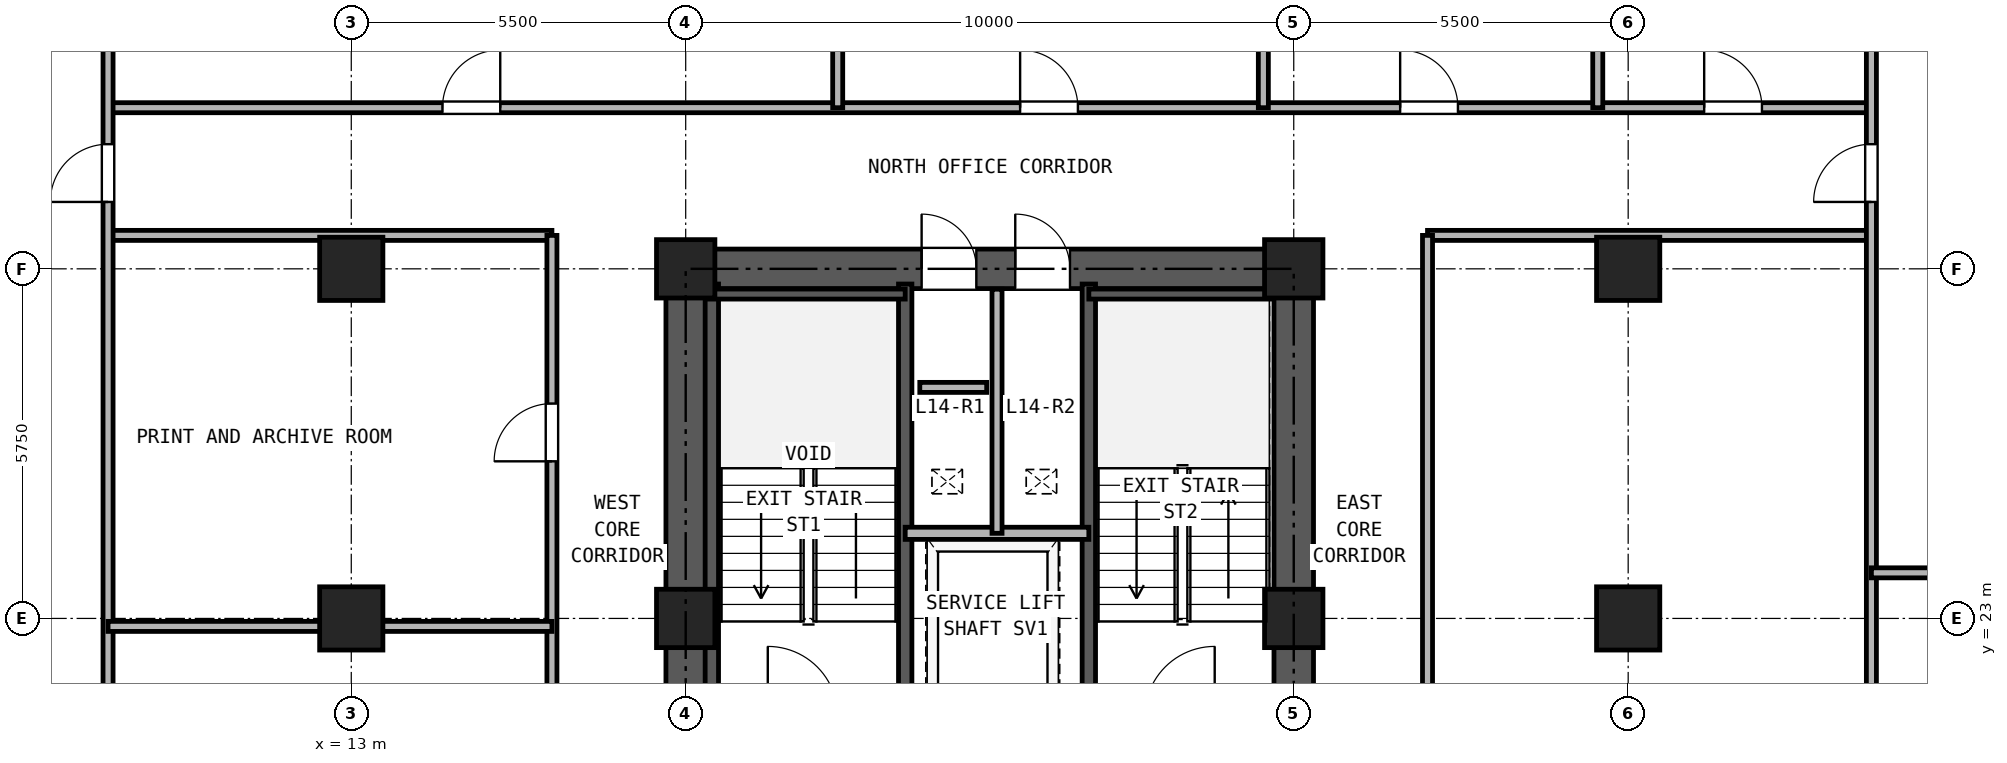
"""IFC4 building model, lengths in metres.
Left out: names, types, materials, properties, quantities, classifications, styles, units other than length and angle.
Written with IfcOpenShell. Run it as: python <this file> out.ifc"""

import sys

from ifc_helpers import new_model, si_unit, direction, frame, frame_2d, origin, origin_2d, place, context, subcontext, project, spatial, rectangle, hollow_rectangle, extrude, source, transform, mapped, element, fill, save


model = new_model("IFC4")
c1 = context("Model", 3, precision=1e-05, world=origin(), true_north=direction((0.0, 1.0)))
c2 = subcontext(c1, "Body", "Model", "MODEL_VIEW")
j1 = project(units=[si_unit("LENGTHUNIT", "METRE"), si_unit("PLANEANGLEUNIT", "RADIAN")], contexts=[c1])
p1 = place(None, origin())
s1 = spatial("IfcSite", under=j1, at=p1, CompositionType="ELEMENT")
p2 = place(p1, origin())
s2 = spatial("IfcBuilding", under=s1, at=p2, CompositionType="ELEMENT")
p3 = place(p2, frame((0.0, 0.0, 54.9)))
s3 = spatial("IfcBuildingStorey", under=s2, at=p3, CompositionType="ELEMENT", Elevation=54.9)
m1 = source(origin(), c2, "Body", "SweptSolid", [
    extrude(hollow_rectangle(XDim=1.04, YDim=1.04, WallThickness=0.065, at=origin_2d()), origin(), (0.0, 0.0, 1.0), 3.32),
])
for number, where, z_axis, x_axis in (
    (1, (13.0, 23.0, 0.0), (0.0, 0.0, 1.0), (1.0, 0.0, 0.0)),
    (2, (13.0, 28.75, 0.0), (0.0, 0.0, 1.0), (1.0, 0.0, 0.0)),
):
    element("IfcColumn", number, at=place(p3, frame(where, z_axis=z_axis, x_axis=x_axis)), inside=s3, PredefinedType="COLUMN", context=c2, shape_type="MappedRepresentation", body=[
        mapped(m1, transform((0.0, 0.0, 0.0), x_axis=(1.0, 0.0, 0.0), y_axis=(0.0, 1.0, 0.0), z_axis=(0.0, 0.0, 1.0), scale=1.0)),
    ])
m2 = source(origin(), c2, "Body", "SweptSolid", [
    extrude(hollow_rectangle(XDim=0.96, YDim=0.96, WallThickness=0.06, at=origin_2d()), origin(), (0.0, 0.0, 1.0), 3.32),
])
for number, where, z_axis, x_axis in (
    (3, (18.5, 23.0, 0.0), (0.0, 0.0, 1.0), (1.0, 0.0, 0.0)),
    (4, (18.5, 28.75, 0.0), (0.0, 0.0, 1.0), (1.0, 0.0, 0.0)),
    (5, (28.5, 23.0, 0.0), (0.0, 0.0, 1.0), (1.0, 0.0, 0.0)),
    (6, (28.5, 28.75, 0.0), (0.0, 0.0, 1.0), (1.0, 0.0, 0.0)),
):
    element("IfcColumn", number, at=place(p3, frame(where, z_axis=z_axis, x_axis=x_axis)), inside=s3, PredefinedType="COLUMN", context=c2, shape_type="MappedRepresentation", body=[
        mapped(m2, transform((0.0, 0.0, 0.0), x_axis=(1.0, 0.0, 0.0), y_axis=(0.0, 1.0, 0.0), z_axis=(0.0, 0.0, 1.0), scale=1.0)),
    ])
for number, where, z_axis, x_axis in (
    (7, (34.0, 23.0, 0.0), (0.0, 0.0, 1.0), (1.0, 0.0, 0.0)),
    (8, (34.0, 28.75, 0.0), (0.0, 0.0, 1.0), (1.0, 0.0, 0.0)),
):
    element("IfcColumn", number, at=place(p3, frame(where, z_axis=z_axis, x_axis=x_axis)), inside=s3, PredefinedType="COLUMN", context=c2, shape_type="MappedRepresentation", body=[
        mapped(m1, transform((0.0, 0.0, 0.0), x_axis=(1.0, 0.0, 0.0), y_axis=(0.0, 1.0, 0.0), z_axis=(0.0, 0.0, 1.0), scale=1.0)),
    ])
p4 = place(p3, frame((18.175, 28.75, 0.0), z_axis=(0.0, 0.0, 1.0), x_axis=(1.0, 0.0, 0.0)))
e9 = element("IfcWall", 9, at=p4, inside=s3, PredefinedType="SHEAR", context=c2, shape_type="SweptSolid", body=[
    extrude(rectangle(XDim=10.65, YDim=0.65, at=frame_2d((5.325, 0.0))), origin(), (0.0, 0.0, 1.0), 3.32),
])
p5 = place(p4, frame((4.205, 0.0, 0.0)))
e10 = element("IfcOpeningElement", 10, at=p5, cuts=e9, PredefinedType="OPENING", context=c2, shape_type="SweptSolid", body=[
    extrude(rectangle(XDim=0.9, YDim=2.05, at=frame_2d((0.45, 1.025))), frame((0.0, 0.335, 0.0), z_axis=(0.0, -1.0, 0.0), x_axis=(1.0, 0.0, 0.0)), (0.0, 0.0, 1.0), 0.67),
])
p6 = place(p4, frame((5.745, 0.0, 0.0)))
e11 = element("IfcOpeningElement", 11, at=p6, cuts=e9, PredefinedType="OPENING", context=c2, shape_type="SweptSolid", body=[
    extrude(rectangle(XDim=0.9, YDim=2.05, at=frame_2d((0.45, 1.025))), frame((0.0, 0.335, 0.0), z_axis=(0.0, -1.0, 0.0), x_axis=(1.0, 0.0, 0.0)), (0.0, 0.0, 1.0), 0.67),
])
p7 = place(p3, frame((18.5, 11.825, 0.0), z_axis=(0.0, 0.0, 1.0), x_axis=(0.0, 1.0, 0.0)))
e12 = element("IfcWall", 12, at=p7, inside=s3, PredefinedType="SHEAR", context=c2, shape_type="SweptSolid", body=[
    extrude(rectangle(XDim=16.6, YDim=0.65, at=frame_2d((8.3, 0.0))), origin(), (0.0, 0.0, 1.0), 3.32),
])
p8 = place(p7, frame((7.325, 0.0, 0.0)))
e13 = element("IfcOpeningElement", 13, at=p8, cuts=e12, PredefinedType="OPENING", context=c2, shape_type="SweptSolid", body=[
    extrude(rectangle(XDim=1.15, YDim=2.2, at=frame_2d((0.575, 1.1))), frame((0.0, 0.335, 0.0), z_axis=(0.0, -1.0, 0.0), x_axis=(1.0, 0.0, 0.0)), (0.0, 0.0, 1.0), 0.67),
])
p9 = place(p3, frame((28.5, 11.825, 0.0), z_axis=(0.0, 0.0, 1.0), x_axis=(0.0, 1.0, 0.0)))
e14 = element("IfcWall", 14, at=p9, inside=s3, PredefinedType="SHEAR", context=c2, shape_type="SweptSolid", body=[
    extrude(rectangle(XDim=16.6, YDim=0.65, at=frame_2d((8.3, 0.0))), origin(), (0.0, 0.0, 1.0), 3.32),
])
p10 = place(p9, frame((7.325, 0.0, 0.0)))
e15 = element("IfcOpeningElement", 15, at=p10, cuts=e14, PredefinedType="OPENING", context=c2, shape_type="SweptSolid", body=[
    extrude(rectangle(XDim=1.15, YDim=2.2, at=frame_2d((0.575, 1.1))), frame((0.0, 0.335, 0.0), z_axis=(0.0, -1.0, 0.0), x_axis=(1.0, 0.0, 0.0)), (0.0, 0.0, 1.0), 0.67),
])
for number, where, z_axis, x_axis in (
    (16, (18.93, 21.39, 0.0), (0.0, 0.0, 1.0), (0.0, 1.0, 0.0)),
    (17, (22.11, 21.39, 0.0), (0.0, 0.0, 1.0), (0.0, 1.0, 0.0)),
    (18, (25.13, 21.39, 0.0), (0.0, 0.0, 1.0), (0.0, 1.0, 0.0)),
):
    element("IfcWall", number, at=place(p3, frame(where, z_axis=z_axis, x_axis=x_axis)), inside=s3, PredefinedType="SOLIDWALL", context=c2, shape_type="SweptSolid", body=[
        extrude(rectangle(XDim=7.11, YDim=0.22, at=frame_2d((3.555, 0.0))), origin(), (0.0, 0.0, 1.0), 3.32),
    ])
p11 = place(p3, frame((18.835, 28.335, 0.0), z_axis=(0.0, 0.0, 1.0), x_axis=(1.0, 0.0, 0.0)))
e19 = element("IfcWall", 19, at=p11, inside=s3, PredefinedType="PARTITIONING", context=c2, shape_type="SweptSolid", body=[
    extrude(rectangle(XDim=3.275, YDim=0.165, at=frame_2d((1.638, 0.0))), origin(), (0.0, 0.0, 1.0), 3.32),
])
p12 = place(p3, frame((25.13, 28.335, 0.0), z_axis=(0.0, 0.0, 1.0), x_axis=(1.0, 0.0, 0.0)))
e20 = element("IfcWall", 20, at=p12, inside=s3, PredefinedType="PARTITIONING", context=c2, shape_type="SweptSolid", body=[
    extrude(rectangle(XDim=3.035, YDim=0.165, at=frame_2d((1.518, 0.0))), origin(), (0.0, 0.0, 1.0), 3.32),
])
p13 = place(p3, frame((22.11, 24.4, 0.0), z_axis=(0.0, 0.0, 1.0), x_axis=(1.0, 0.0, 0.0)))
e21 = element("IfcWall", 21, at=p13, inside=s3, PredefinedType="PARTITIONING", context=c2, shape_type="SweptSolid", body=[
    extrude(rectangle(XDim=3.02, YDim=0.2, at=frame_2d((1.51, 0.0))), origin(), (0.0, 0.0, 1.0), 3.32),
])
p14 = place(p3, frame((23.62, 24.4, 0.0), z_axis=(0.0, 0.0, 1.0), x_axis=(0.0, 1.0, 0.0)))
e22 = element("IfcWall", 22, at=p14, inside=s3, PredefinedType="PARTITIONING", context=c2, shape_type="SweptSolid", body=[
    extrude(rectangle(XDim=4.015, YDim=0.165, at=frame_2d((2.008, 0.0))), origin(), (0.0, 0.0, 1.0), 3.32),
])
p15 = place(p3, frame((9.0, 31.4, 0.0), z_axis=(0.0, 0.0, 1.0), x_axis=(1.0, 0.0, 0.0)))
e23 = element("IfcWall", 23, at=p15, inside=s3, PredefinedType="PARTITIONING", context=c2, shape_type="SweptSolid", body=[
    extrude(rectangle(XDim=29.0, YDim=0.165, at=frame_2d((14.5, 0.0))), origin(), (0.0, 0.0, 1.0), 2.898),
])
p16 = place(p15, frame((5.5, 0.0, 0.0)))
e24 = element("IfcOpeningElement", 24, at=p16, cuts=e23, PredefinedType="OPENING", context=c2, shape_type="SweptSolid", body=[
    extrude(rectangle(XDim=0.95, YDim=2.15, at=frame_2d((0.475, 1.075))), frame((0.0, 0.093, 0.0), z_axis=(0.0, -1.0, 0.0), x_axis=(1.0, 0.0, 0.0)), (0.0, 0.0, 1.0), 0.185),
])
p17 = place(p15, frame((15.0, 0.0, 0.0)))
e25 = element("IfcOpeningElement", 25, at=p17, cuts=e23, PredefinedType="OPENING", context=c2, shape_type="SweptSolid", body=[
    extrude(rectangle(XDim=0.95, YDim=2.15, at=frame_2d((0.475, 1.075))), frame((0.0, 0.093, 0.0), z_axis=(0.0, -1.0, 0.0), x_axis=(1.0, 0.0, 0.0)), (0.0, 0.0, 1.0), 0.185),
])
p18 = place(p15, frame((21.25, 0.0, 0.0)))
e26 = element("IfcOpeningElement", 26, at=p18, cuts=e23, PredefinedType="OPENING", context=c2, shape_type="SweptSolid", body=[
    extrude(rectangle(XDim=0.95, YDim=2.15, at=frame_2d((0.475, 1.075))), frame((0.0, 0.093, 0.0), z_axis=(0.0, -1.0, 0.0), x_axis=(1.0, 0.0, 0.0)), (0.0, 0.0, 1.0), 0.185),
])
p19 = place(p15, frame((26.25, 0.0, 0.0)))
e27 = element("IfcOpeningElement", 27, at=p19, cuts=e23, PredefinedType="OPENING", context=c2, shape_type="SweptSolid", body=[
    extrude(rectangle(XDim=0.95, YDim=2.15, at=frame_2d((0.475, 1.075))), frame((0.0, 0.093, 0.0), z_axis=(0.0, -1.0, 0.0), x_axis=(1.0, 0.0, 0.0)), (0.0, 0.0, 1.0), 0.185),
])
for number, where, z_axis, x_axis in (
    (28, (9.0, 29.3, 0.0), (0.0, 0.0, 1.0), (1.0, 0.0, 0.0)),
    (29, (30.7, 29.3, 0.0), (0.0, 0.0, 1.0), (1.0, 0.0, 0.0)),
):
    element("IfcWall", number, at=place(p3, frame(where, z_axis=z_axis, x_axis=x_axis)), inside=s3, PredefinedType="PARTITIONING", context=c2, shape_type="SweptSolid", body=[
        extrude(rectangle(XDim=7.3, YDim=0.165, at=frame_2d((3.65, 0.0))), origin(), (0.0, 0.0, 1.0), 3.32),
    ])
p20 = place(p3, frame((16.3, 11.05, 0.0), z_axis=(0.0, 0.0, 1.0), x_axis=(0.0, 1.0, 0.0)))
e30 = element("IfcWall", 30, at=p20, inside=s3, PredefinedType="PARTITIONING", context=c2, shape_type="SweptSolid", body=[
    extrude(rectangle(XDim=18.25, YDim=0.165, at=frame_2d((9.125, 0.0))), origin(), (0.0, 0.0, 1.0), 3.32),
])
p21 = place(p20, frame((5.409, 0.0, 0.0)))
e31 = element("IfcOpeningElement", 31, at=p21, cuts=e30, PredefinedType="OPENING", context=c2, shape_type="SweptSolid", body=[
    extrude(rectangle(XDim=0.95, YDim=2.15, at=frame_2d((0.475, 1.075))), frame((0.0, 0.093, 0.0), z_axis=(0.0, -1.0, 0.0), x_axis=(1.0, 0.0, 0.0)), (0.0, 0.0, 1.0), 0.185),
])
p22 = place(p20, frame((14.534, 0.0, 0.0)))
e32 = element("IfcOpeningElement", 32, at=p22, cuts=e30, PredefinedType="OPENING", context=c2, shape_type="SweptSolid", body=[
    extrude(rectangle(XDim=0.95, YDim=2.15, at=frame_2d((0.475, 1.075))), frame((0.0, 0.093, 0.0), z_axis=(0.0, -1.0, 0.0), x_axis=(1.0, 0.0, 0.0)), (0.0, 0.0, 1.0), 0.185),
])
p23 = place(p3, frame((30.7, 11.05, 0.0), z_axis=(0.0, 0.0, 1.0), x_axis=(0.0, 1.0, 0.0)))
e33 = element("IfcWall", 33, at=p23, inside=s3, PredefinedType="PARTITIONING", context=c2, shape_type="SweptSolid", body=[
    extrude(rectangle(XDim=18.25, YDim=0.165, at=frame_2d((9.125, 0.0))), origin(), (0.0, 0.0, 1.0), 3.32),
])
p24 = place(p23, frame((8.625, 0.0, 0.0)))
e34 = element("IfcOpeningElement", 34, at=p24, cuts=e33, PredefinedType="OPENING", context=c2, shape_type="SweptSolid", body=[
    extrude(rectangle(XDim=0.95, YDim=2.15, at=frame_2d((0.475, 1.075))), frame((0.0, 0.093, 0.0), z_axis=(0.0, -1.0, 0.0), x_axis=(1.0, 0.0, 0.0)), (0.0, 0.0, 1.0), 0.185),
])
p25 = place(p3, frame((9.0, 0.16, 0.0), z_axis=(0.0, 0.0, 1.0), x_axis=(0.0, 1.0, 0.0)))
e35 = element("IfcWall", 35, at=p25, inside=s3, PredefinedType="PARTITIONING", context=c2, shape_type="SweptSolid", body=[
    extrude(rectangle(XDim=40.18, YDim=0.165, at=frame_2d((20.09, 0.0))), origin(), (0.0, 0.0, 1.0), 3.32),
])
p26 = place(p25, frame((9.34, 0.0, 0.0)))
e36 = element("IfcOpeningElement", 36, at=p26, cuts=e35, PredefinedType="OPENING", context=c2, shape_type="SweptSolid", body=[
    extrude(rectangle(XDim=0.95, YDim=2.15, at=frame_2d((0.475, 1.075))), frame((0.0, 0.093, 0.0), z_axis=(0.0, -1.0, 0.0), x_axis=(1.0, 0.0, 0.0)), (0.0, 0.0, 1.0), 0.185),
])
p27 = place(p25, frame((29.69, 0.0, 0.0)))
e37 = element("IfcOpeningElement", 37, at=p27, cuts=e35, PredefinedType="OPENING", context=c2, shape_type="SweptSolid", body=[
    extrude(rectangle(XDim=0.95, YDim=2.15, at=frame_2d((0.475, 1.075))), frame((0.0, 0.093, 0.0), z_axis=(0.0, -1.0, 0.0), x_axis=(1.0, 0.0, 0.0)), (0.0, 0.0, 1.0), 0.185),
])
p28 = place(p3, frame((38.0, 0.16, 0.0), z_axis=(0.0, 0.0, 1.0), x_axis=(0.0, 1.0, 0.0)))
e38 = element("IfcWall", 38, at=p28, inside=s3, PredefinedType="PARTITIONING", context=c2, shape_type="SweptSolid", body=[
    extrude(rectangle(XDim=40.18, YDim=0.165, at=frame_2d((20.09, 0.0))), origin(), (0.0, 0.0, 1.0), 3.32),
])
p29 = place(p28, frame((9.34, 0.0, 0.0)))
e39 = element("IfcOpeningElement", 39, at=p29, cuts=e38, PredefinedType="OPENING", context=c2, shape_type="SweptSolid", body=[
    extrude(rectangle(XDim=0.95, YDim=2.15, at=frame_2d((0.475, 1.075))), frame((0.0, 0.093, 0.0), z_axis=(0.0, -1.0, 0.0), x_axis=(1.0, 0.0, 0.0)), (0.0, 0.0, 1.0), 0.185),
])
p30 = place(p28, frame((29.69, 0.0, 0.0)))
e40 = element("IfcOpeningElement", 40, at=p30, cuts=e38, PredefinedType="OPENING", context=c2, shape_type="SweptSolid", body=[
    extrude(rectangle(XDim=0.95, YDim=2.15, at=frame_2d((0.475, 1.075))), frame((0.0, 0.093, 0.0), z_axis=(0.0, -1.0, 0.0), x_axis=(1.0, 0.0, 0.0)), (0.0, 0.0, 1.0), 0.185),
])
for number, where, z_axis, x_axis in (
    (41, (21.0, 31.4, 0.0), (0.0, 0.0, 1.0), (0.0, 1.0, 0.0)),
    (42, (28.0, 31.4, 0.0), (0.0, 0.0, 1.0), (0.0, 1.0, 0.0)),
    (43, (33.5, 31.4, 0.0), (0.0, 0.0, 1.0), (0.0, 1.0, 0.0)),
):
    element("IfcWall", number, at=place(p3, frame(where, z_axis=z_axis, x_axis=x_axis)), inside=s3, PredefinedType="PARTITIONING", context=c2, shape_type="SweptSolid", body=[
        extrude(rectangle(XDim=8.94, YDim=0.165, at=frame_2d((4.47, 0.0))), origin(), (0.0, 0.0, 1.0), 3.32),
    ])
p31 = place(p3, frame((38.0, 23.75, 0.0), z_axis=(0.0, 0.0, 1.0), x_axis=(1.0, 0.0, 0.0)))
e44 = element("IfcWall", 44, at=p31, inside=s3, PredefinedType="PARTITIONING", context=c2, shape_type="SweptSolid", body=[
    extrude(rectangle(XDim=8.84, YDim=0.165, at=frame_2d((4.42, 0.0))), origin(), (0.0, 0.0, 1.0), 3.32),
])
p32 = place(p3, frame((9.0, 22.869, 0.0), z_axis=(0.0, 0.0, 1.0), x_axis=(1.0, 0.0, 0.0)))
e45 = element("IfcWall", 45, at=p32, inside=s3, PredefinedType="PARTITIONING", context=c2, shape_type="SweptSolid", body=[
    extrude(rectangle(XDim=7.3, YDim=0.165, at=frame_2d((3.65, 0.0))), origin(), (0.0, 0.0, 1.0), 2.539),
])
p33 = place(p3, frame((22.35, 26.8, 0.0), z_axis=(0.0, 0.0, 1.0), x_axis=(1.0, 0.0, 0.0)))
e46 = element("IfcWall", 46, at=p33, inside=s3, PredefinedType="PARTITIONING", context=c2, shape_type="SweptSolid", body=[
    extrude(rectangle(XDim=1.1, YDim=0.165, at=frame_2d((0.55, 0.0))), origin(), (0.0, 0.0, 1.0), 3.32),
])
p34 = place(p5, origin())
e47 = element("IfcDoor", 47, at=p34, inside=s3, OperationType="SINGLE_SWING_LEFT", PredefinedType="DOOR", context=c2, shape_type="SweptSolid", body=[
    extrude(rectangle(XDim=0.9, YDim=2.05, at=frame_2d((0.45, 1.025))), frame((0.0, 0.025, 0.0), z_axis=(0.0, -1.0, 0.0), x_axis=(1.0, 0.0, 0.0)), (0.0, 0.0, 1.0), 0.05),
])
fill(e10, e47)
p35 = place(p6, origin())
e48 = element("IfcDoor", 48, at=p35, inside=s3, OperationType="SINGLE_SWING_LEFT", PredefinedType="DOOR", context=c2, shape_type="SweptSolid", body=[
    extrude(rectangle(XDim=0.9, YDim=2.05, at=frame_2d((0.45, 1.025))), frame((0.0, 0.025, 0.0), z_axis=(0.0, -1.0, 0.0), x_axis=(1.0, 0.0, 0.0)), (0.0, 0.0, 1.0), 0.05),
])
fill(e11, e48)
p36 = place(p16, origin())
e49 = element("IfcDoor", 49, at=p36, inside=s3, OperationType="SINGLE_SWING_RIGHT", PredefinedType="DOOR", context=c2, shape_type="SweptSolid", body=[
    extrude(rectangle(XDim=0.95, YDim=2.15, at=frame_2d((0.475, 1.075))), frame((0.0, 0.025, 0.0), z_axis=(0.0, -1.0, 0.0), x_axis=(1.0, 0.0, 0.0)), (0.0, 0.0, 1.0), 0.05),
])
fill(e24, e49)
p37 = place(p17, origin())
e50 = element("IfcDoor", 50, at=p37, inside=s3, OperationType="SINGLE_SWING_LEFT", PredefinedType="DOOR", context=c2, shape_type="SweptSolid", body=[
    extrude(rectangle(XDim=0.95, YDim=2.15, at=frame_2d((0.475, 1.075))), frame((0.0, 0.025, 0.0), z_axis=(0.0, -1.0, 0.0), x_axis=(1.0, 0.0, 0.0)), (0.0, 0.0, 1.0), 0.05),
])
fill(e25, e50)
p38 = place(p18, origin())
e51 = element("IfcDoor", 51, at=p38, inside=s3, OperationType="SINGLE_SWING_LEFT", PredefinedType="DOOR", context=c2, shape_type="SweptSolid", body=[
    extrude(rectangle(XDim=0.95, YDim=2.15, at=frame_2d((0.475, 1.075))), frame((0.0, 0.025, 0.0), z_axis=(0.0, -1.0, 0.0), x_axis=(1.0, 0.0, 0.0)), (0.0, 0.0, 1.0), 0.05),
])
fill(e26, e51)
p39 = place(p19, origin())
e52 = element("IfcDoor", 52, at=p39, inside=s3, OperationType="SINGLE_SWING_LEFT", PredefinedType="DOOR", context=c2, shape_type="SweptSolid", body=[
    extrude(rectangle(XDim=0.95, YDim=2.15, at=frame_2d((0.475, 1.075))), frame((0.0, 0.025, 0.0), z_axis=(0.0, -1.0, 0.0), x_axis=(1.0, 0.0, 0.0)), (0.0, 0.0, 1.0), 0.05),
])
fill(e27, e52)
p40 = place(p27, frame((0.95, 0.0, 0.0), z_axis=(0.0, 0.0, 1.0), x_axis=(-1.0, 0.0, 0.0)))
e53 = element("IfcDoor", 53, at=p40, inside=s3, OperationType="SINGLE_SWING_LEFT", PredefinedType="DOOR", context=c2, shape_type="SweptSolid", body=[
    extrude(rectangle(XDim=0.95, YDim=2.15, at=frame_2d((0.475, 1.075))), frame((0.0, 0.025, 0.0), z_axis=(0.0, -1.0, 0.0), x_axis=(1.0, 0.0, 0.0)), (0.0, 0.0, 1.0), 0.05),
])
fill(e37, e53)
p41 = place(p30, origin())
e54 = element("IfcDoor", 54, at=p41, inside=s3, OperationType="SINGLE_SWING_LEFT", PredefinedType="DOOR", context=c2, shape_type="SweptSolid", body=[
    extrude(rectangle(XDim=0.95, YDim=2.15, at=frame_2d((0.475, 1.075))), frame((0.0, 0.025, 0.0), z_axis=(0.0, -1.0, 0.0), x_axis=(1.0, 0.0, 0.0)), (0.0, 0.0, 1.0), 0.05),
])
fill(e40, e54)
p42 = place(p22, frame((0.95, 0.0, 0.0), z_axis=(0.0, 0.0, 1.0), x_axis=(-1.0, 0.0, 0.0)))
e55 = element("IfcDoor", 55, at=p42, inside=s3, OperationType="SINGLE_SWING_LEFT", PredefinedType="DOOR", context=c2, shape_type="SweptSolid", body=[
    extrude(rectangle(XDim=0.95, YDim=2.15, at=frame_2d((0.475, 1.075))), frame((0.0, 0.025, 0.0), z_axis=(0.0, -1.0, 0.0), x_axis=(1.0, 0.0, 0.0)), (0.0, 0.0, 1.0), 0.05),
])
fill(e32, e55)
save(model, sys.argv[1])
